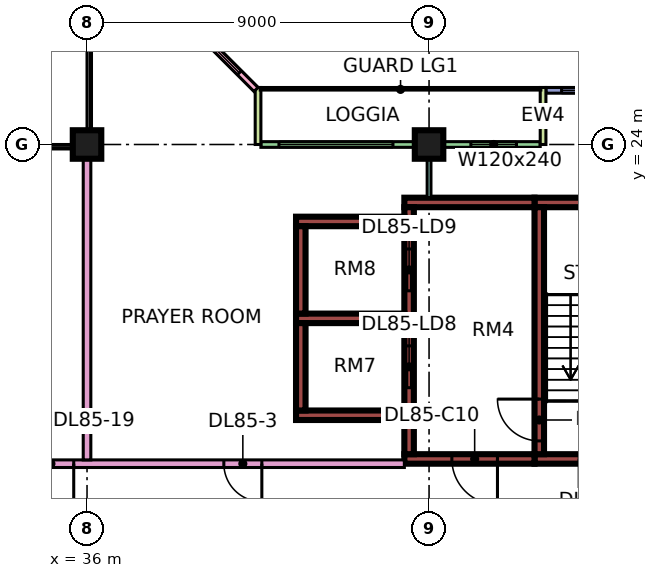
"""IFC4 building model, lengths in metres.
Left out: names, types, materials, properties, quantities, classifications, styles, units other than length and angle.
Written with IfcOpenShell. Run it as: python <this file> out.ifc"""

import sys

from ifc_helpers import new_model, si_unit, direction, frame, frame_2d, origin, origin_2d, place, context, subcontext, project, spatial, rectangle, extrude, element, fill, save


model = new_model("IFC4")
c1 = context("Model", 3, precision=1e-05, world=origin(), true_north=direction((0.0, 1.0)))
c2 = subcontext(c1, "Body", "Model", "MODEL_VIEW")
j1 = project(units=[si_unit("LENGTHUNIT", "METRE"), si_unit("PLANEANGLEUNIT", "RADIAN")], contexts=[c1])
p1 = place(None, origin())
s1 = spatial("IfcSite", under=j1, at=p1, CompositionType="ELEMENT")
p2 = place(p1, origin())
s2 = spatial("IfcBuilding", under=s1, at=p2, CompositionType="ELEMENT")
p3 = place(p2, frame((0.0, 0.0, 365.15)))
s3 = spatial("IfcBuildingStorey", under=s2, at=p3, CompositionType="ELEMENT", Elevation=365.15)
for number, where, z_axis, x_axis in (
    (1, (36.0, 24.0, 0.0), (0.0, 0.0, 1.0), (1.0, 0.0, 0.0)),
    (2, (45.0, 24.0, 0.0), (0.0, 0.0, 1.0), (1.0, 0.0, 0.0)),
):
    element("IfcColumn", number, at=place(p3, frame(where, z_axis=z_axis, x_axis=x_axis)), inside=s3, PredefinedType="COLUMN", context=c2, shape_type="SweptSolid", body=[
        extrude(rectangle(XDim=0.75, YDim=0.75, at=origin_2d()), origin(), (0.0, 0.0, 1.0), 3.75),
    ])
p4 = place(p3, frame((47.775, 15.725, 0.0), z_axis=(0.0, 0.0, 1.0), x_axis=(1.0, 0.0, 0.0)))
e3 = element("IfcWall", 3, at=p4, inside=s3, PredefinedType="SHEAR", context=c2, shape_type="SweptSolid", body=[
    extrude(rectangle(XDim=3.45, YDim=0.25, at=frame_2d((1.725, 0.0))), origin(), (0.0, 0.0, 1.0), 3.75),
])
p5 = place(p4, frame((1.175, 0.0, 0.0)))
e4 = element("IfcOpeningElement", 4, at=p5, cuts=e3, PredefinedType="OPENING", context=c2, shape_type="SweptSolid", body=[
    extrude(rectangle(XDim=1.1, YDim=2.2, at=frame_2d((0.55, 1.1))), frame((0.0, 0.135, 0.0), z_axis=(0.0, -1.0, 0.0), x_axis=(1.0, 0.0, 0.0)), (0.0, 0.0, 1.0), 0.27),
])
p6 = place(p3, frame((47.775, 22.475, 0.0), z_axis=(0.0, 0.0, 1.0), x_axis=(1.0, 0.0, 0.0)))
e5 = element("IfcWall", 5, at=p6, inside=s3, PredefinedType="SHEAR", context=c2, shape_type="SweptSolid", body=[
    extrude(rectangle(XDim=3.45, YDim=0.25, at=frame_2d((1.725, 0.0))), origin(), (0.0, 0.0, 1.0), 3.75),
])
p7 = place(p3, frame((47.9, 15.85, 0.0), z_axis=(0.0, 0.0, 1.0), x_axis=(0.0, 1.0, 0.0)))
e6 = element("IfcWall", 6, at=p7, inside=s3, PredefinedType="SHEAR", context=c2, shape_type="SweptSolid", body=[
    extrude(rectangle(XDim=6.5, YDim=0.25, at=frame_2d((3.25, 0.0))), origin(), (0.0, 0.0, 1.0), 3.75),
])
p8 = place(p7, frame((0.35, 0.0, 0.0)))
e7 = element("IfcOpeningElement", 7, at=p8, cuts=e6, PredefinedType="OPENING", context=c2, shape_type="SweptSolid", body=[
    extrude(rectangle(XDim=1.1, YDim=2.2, at=frame_2d((0.55, 1.1))), frame((0.0, 0.135, 0.0), z_axis=(0.0, -1.0, 0.0), x_axis=(1.0, 0.0, 0.0)), (0.0, 0.0, 1.0), 0.27),
])
p9 = place(p3, frame((44.35, 15.725, 0.0), z_axis=(0.0, 0.0, 1.0), x_axis=(1.0, 0.0, 0.0)))
e8 = element("IfcWall", 8, at=p9, inside=s3, PredefinedType="SHEAR", context=c2, shape_type="SweptSolid", body=[
    extrude(rectangle(XDim=3.425, YDim=0.25, at=frame_2d((1.712, 0.0))), origin(), (0.0, 0.0, 1.0), 3.75),
])
p10 = place(p9, frame((1.25, 0.0, 0.0)))
e9 = element("IfcOpeningElement", 9, at=p10, cuts=e8, PredefinedType="OPENING", context=c2, shape_type="SweptSolid", body=[
    extrude(rectangle(XDim=1.2, YDim=2.2, at=frame_2d((0.6, 1.1))), frame((0.0, 0.135, 0.0), z_axis=(0.0, -1.0, 0.0), x_axis=(1.0, 0.0, 0.0)), (0.0, 0.0, 1.0), 0.27),
])
p11 = place(p3, frame((44.35, 22.475, 0.0), z_axis=(0.0, 0.0, 1.0), x_axis=(1.0, 0.0, 0.0)))
e10 = element("IfcWall", 10, at=p11, inside=s3, PredefinedType="SHEAR", context=c2, shape_type="SweptSolid", body=[
    extrude(rectangle(XDim=3.425, YDim=0.25, at=frame_2d((1.712, 0.0))), origin(), (0.0, 0.0, 1.0), 3.75),
])
p12 = place(p3, frame((44.475, 15.85, 0.0), z_axis=(0.0, 0.0, 1.0), x_axis=(0.0, 1.0, 0.0)))
e11 = element("IfcWall", 11, at=p12, inside=s3, PredefinedType="SHEAR", context=c2, shape_type="SweptSolid", body=[
    extrude(rectangle(XDim=6.5, YDim=0.25, at=frame_2d((3.25, 0.0))), origin(), (0.0, 0.0, 1.0), 3.75),
])
p13 = place(p12, frame((1.75, 0.0, 0.0)))
e12 = element("IfcOpeningElement", 12, at=p13, cuts=e11, PredefinedType="OPENING", context=c2, shape_type="SweptSolid", body=[
    extrude(rectangle(XDim=1.1, YDim=2.2, at=frame_2d((0.55, 1.1))), frame((0.0, 0.135, 0.0), z_axis=(0.0, -1.0, 0.0), x_axis=(1.0, 0.0, 0.0)), (0.0, 0.0, 1.0), 0.27),
])
p14 = place(p12, frame((4.3, 0.0, 0.0)))
e13 = element("IfcOpeningElement", 13, at=p14, cuts=e11, PredefinedType="OPENING", context=c2, shape_type="SweptSolid", body=[
    extrude(rectangle(XDim=1.1, YDim=2.2, at=frame_2d((0.55, 1.1))), frame((0.0, 0.135, 0.0), z_axis=(0.0, -1.0, 0.0), x_axis=(1.0, 0.0, 0.0)), (0.0, 0.0, 1.0), 0.27),
])
for number, where, z_axis, x_axis in (
    (14, (41.5, 16.875, 0.0), (0.0, 0.0, 1.0), (1.0, 0.0, 0.0)),
    (15, (41.5, 19.425, 0.0), (0.0, 0.0, 1.0), (1.0, 0.0, 0.0)),
    (16, (41.5, 21.975, 0.0), (0.0, 0.0, 1.0), (1.0, 0.0, 0.0)),
):
    element("IfcWall", number, at=place(p3, frame(where, z_axis=z_axis, x_axis=x_axis)), inside=s3, PredefinedType="SHEAR", context=c2, shape_type="SweptSolid", body=[
        extrude(rectangle(XDim=2.85, YDim=0.25, at=frame_2d((1.425, 0.0))), origin(), (0.0, 0.0, 1.0), 3.75),
    ])
for number, where, z_axis, x_axis in (
    (17, (41.625, 17.0, 0.0), (0.0, 0.0, 1.0), (0.0, 1.0, 0.0)),
    (18, (41.625, 19.55, 0.0), (0.0, 0.0, 1.0), (0.0, 1.0, 0.0)),
):
    element("IfcWall", number, at=place(p3, frame(where, z_axis=z_axis, x_axis=x_axis)), inside=s3, PredefinedType="SHEAR", context=c2, shape_type="SweptSolid", body=[
        extrude(rectangle(XDim=2.3, YDim=0.25, at=frame_2d((1.15, 0.0))), origin(), (0.0, 0.0, 1.0), 3.75),
    ])
p15 = place(p3, frame((52.5, 25.425, 0.0), z_axis=(0.0, 0.0, 1.0), x_axis=(-1.0, 0.0, 0.0)))
e19 = element("IfcWall", 19, at=p15, inside=s3, PredefinedType="SOLIDWALL", context=c2, shape_type="SweptSolid", body=[
    extrude(rectangle(XDim=4.425, YDim=0.15, at=frame_2d((2.212, 0.0))), origin(), (0.0, 0.0, 1.0), 3.35),
])
p16 = place(p15, frame((0.413, 0.0, 0.45)))
e20 = element("IfcOpeningElement", 20, at=p16, cuts=e19, PredefinedType="OPENING", context=c2, shape_type="SweptSolid", body=[
    extrude(rectangle(XDim=3.6, YDim=2.4, at=frame_2d((1.8, 1.2))), frame((0.0, 0.085, 0.0), z_axis=(0.0, -1.0, 0.0), x_axis=(1.0, 0.0, 0.0)), (0.0, 0.0, 1.0), 0.17),
])
p17 = place(p3, frame((47.925, 24.0, 0.0), z_axis=(0.0, 0.0, 1.0), x_axis=(-1.0, 0.0, 0.0)))
e21 = element("IfcWall", 21, at=p17, inside=s3, PredefinedType="SOLIDWALL", context=c2, shape_type="SweptSolid", body=[
    extrude(rectangle(XDim=7.35, YDim=0.15, at=frame_2d((3.675, 0.0))), origin(), (0.0, 0.0, 1.0), 3.35),
])
p18 = place(p17, frame((0.625, 0.0, 0.45)))
e22 = element("IfcOpeningElement", 22, at=p18, cuts=e21, PredefinedType="OPENING", context=c2, shape_type="SweptSolid", body=[
    extrude(rectangle(XDim=1.2, YDim=2.4, at=frame_2d((0.6, 1.2))), frame((0.0, 0.085, 0.0), z_axis=(0.0, -1.0, 0.0), x_axis=(1.0, 0.0, 0.0)), (0.0, 0.0, 1.0), 0.17),
])
p19 = place(p17, frame((3.875, 0.0, 0.45)))
e23 = element("IfcOpeningElement", 23, at=p19, cuts=e21, PredefinedType="OPENING", context=c2, shape_type="SweptSolid", body=[
    extrude(rectangle(XDim=3.0, YDim=2.4, at=frame_2d((1.5, 1.2))), frame((0.0, 0.085, 0.0), z_axis=(0.0, -1.0, 0.0), x_axis=(1.0, 0.0, 0.0)), (0.0, 0.0, 1.0), 0.17),
])
for number, where, z_axis, x_axis in (
    (24, (48.0, 25.5, 0.0), (0.0, 0.0, 1.0), (0.0, -1.0, 0.0)),
    (25, (40.5, 25.5, 0.0), (0.0, 0.0, 1.0), (0.0, -1.0, 0.0)),
):
    element("IfcWall", number, at=place(p3, frame(where, z_axis=z_axis, x_axis=x_axis)), inside=s3, PredefinedType="SOLIDWALL", context=c2, shape_type="SweptSolid", body=[
        extrude(rectangle(XDim=1.5, YDim=0.15, at=frame_2d((0.75, 0.0))), origin(), (0.0, 0.0, 1.0), 3.35),
    ])
p20 = place(p3, frame((40.447, 25.447, 0.0), z_axis=(0.0, 0.0, 1.0), x_axis=(-0.707106781187, 0.707106781187, 0.0)))
e26 = element("IfcWall", 26, at=p20, inside=s3, PredefinedType="SOLIDWALL", context=c2, shape_type="SweptSolid", body=[
    extrude(rectangle(XDim=4.243, YDim=0.15, at=frame_2d((2.121, 0.0))), origin(), (0.0, 0.0, 1.0), 3.35),
])
p21 = place(p20, frame((0.621, 0.0, 0.45)))
e27 = element("IfcOpeningElement", 27, at=p21, cuts=e26, PredefinedType="OPENING", context=c2, shape_type="SweptSolid", body=[
    extrude(rectangle(XDim=3.0, YDim=2.4, at=frame_2d((1.5, 1.2))), frame((0.0, 0.085, 0.0), z_axis=(0.0, -1.0, 0.0), x_axis=(1.0, 0.0, 0.0)), (0.0, 0.0, 1.0), 0.17),
])
p22 = place(p3, frame((34.0, 15.6, 0.0), z_axis=(0.0, 0.0, 1.0), x_axis=(1.0, 0.0, 0.0)))
e28 = element("IfcWall", 28, at=p22, inside=s3, PredefinedType="PARTITIONING", context=c2, shape_type="SweptSolid", body=[
    extrude(rectangle(XDim=10.35, YDim=0.2, at=frame_2d((5.175, 0.0))), origin(), (0.0, 0.0, 1.0), 3.35),
])
p23 = place(p22, frame((5.6, 0.0, 0.0)))
e29 = element("IfcOpeningElement", 29, at=p23, cuts=e28, PredefinedType="OPENING", context=c2, shape_type="SweptSolid", body=[
    extrude(rectangle(XDim=1.0, YDim=2.1, at=frame_2d((0.5, 1.05))), frame((0.0, 0.11, 0.0), z_axis=(0.0, -1.0, 0.0), x_axis=(1.0, 0.0, 0.0)), (0.0, 0.0, 1.0), 0.22),
])
p24 = place(p22, frame((0.45, 0.0, 0.0)))
e30 = element("IfcOpeningElement", 30, at=p24, cuts=e28, PredefinedType="OPENING", context=c2, shape_type="SweptSolid", body=[
    extrude(rectangle(XDim=1.2, YDim=2.1, at=frame_2d((0.6, 1.05))), frame((0.0, 0.11, 0.0), z_axis=(0.0, -1.0, 0.0), x_axis=(1.0, 0.0, 0.0)), (0.0, 0.0, 1.0), 0.22),
])
p25 = place(p3, frame((36.0, 15.7, 0.0), z_axis=(0.0, 0.0, 1.0), x_axis=(0.0, 1.0, 0.0)))
e31 = element("IfcWall", 31, at=p25, inside=s3, PredefinedType="PARTITIONING", context=c2, shape_type="SweptSolid", body=[
    extrude(rectangle(XDim=8.3, YDim=0.2, at=frame_2d((4.15, 0.0))), origin(), (0.0, 0.0, 1.0), 3.35),
])
p26 = place(p3, frame((45.0, 22.6, 0.0), z_axis=(0.0, 0.0, 1.0), x_axis=(0.0, 1.0, 0.0)))
e32 = element("IfcWall", 32, at=p26, inside=s3, PredefinedType="PARTITIONING", context=c2, shape_type="SweptSolid", body=[
    extrude(rectangle(XDim=1.326, YDim=0.1, at=frame_2d((0.663, 0.0))), origin(), (0.0, 0.0, 1.0), 3.35),
])
p27 = place(p16, origin())
e33 = element("IfcWindow", 33, at=p27, inside=s3, PartitioningType="SINGLE_PANEL", PredefinedType="WINDOW", context=c2, shape_type="SweptSolid", body=[
    extrude(rectangle(XDim=3.6, YDim=2.4, at=frame_2d((1.8, 1.2))), frame((0.0, 0.03, 0.0), z_axis=(0.0, -1.0, 0.0), x_axis=(1.0, 0.0, 0.0)), (0.0, 0.0, 1.0), 0.06),
])
fill(e20, e33)
p28 = place(p18, origin())
e34 = element("IfcWindow", 34, at=p28, inside=s3, PartitioningType="SINGLE_PANEL", PredefinedType="WINDOW", context=c2, shape_type="SweptSolid", body=[
    extrude(rectangle(XDim=1.2, YDim=2.4, at=frame_2d((0.6, 1.2))), frame((0.0, 0.03, 0.0), z_axis=(0.0, -1.0, 0.0), x_axis=(1.0, 0.0, 0.0)), (0.0, 0.0, 1.0), 0.06),
])
fill(e22, e34)
p29 = place(p19, origin())
e35 = element("IfcWindow", 35, at=p29, inside=s3, PartitioningType="SINGLE_PANEL", PredefinedType="WINDOW", context=c2, shape_type="SweptSolid", body=[
    extrude(rectangle(XDim=3.0, YDim=2.4, at=frame_2d((1.5, 1.2))), frame((0.0, 0.03, 0.0), z_axis=(0.0, -1.0, 0.0), x_axis=(1.0, 0.0, 0.0)), (0.0, 0.0, 1.0), 0.06),
])
fill(e23, e35)
p30 = place(p21, origin())
e36 = element("IfcWindow", 36, at=p30, inside=s3, PartitioningType="SINGLE_PANEL", PredefinedType="WINDOW", context=c2, shape_type="SweptSolid", body=[
    extrude(rectangle(XDim=3.0, YDim=2.4, at=frame_2d((1.5, 1.2))), frame((0.0, 0.03, 0.0), z_axis=(0.0, -1.0, 0.0), x_axis=(1.0, 0.0, 0.0)), (0.0, 0.0, 1.0), 0.06),
])
fill(e27, e36)
p31 = place(p10, origin())
e37 = element("IfcDoor", 37, at=p31, inside=s3, OperationType="SINGLE_SWING_RIGHT", PredefinedType="DOOR", context=c2, shape_type="SweptSolid", body=[
    extrude(rectangle(XDim=1.2, YDim=2.2, at=frame_2d((0.6, 1.1))), frame((0.0, 0.025, 0.0), z_axis=(0.0, -1.0, 0.0), x_axis=(1.0, 0.0, 0.0)), (0.0, 0.0, 1.0), 0.05),
])
fill(e9, e37)
p32 = place(p8, frame((1.1, 0.0, 0.0), z_axis=(0.0, 0.0, 1.0), x_axis=(-1.0, 0.0, 0.0)))
e38 = element("IfcDoor", 38, at=p32, inside=s3, OperationType="SINGLE_SWING_RIGHT", PredefinedType="DOOR", context=c2, shape_type="SweptSolid", body=[
    extrude(rectangle(XDim=1.1, YDim=2.2, at=frame_2d((0.55, 1.1))), frame((0.0, 0.025, 0.0), z_axis=(0.0, -1.0, 0.0), x_axis=(1.0, 0.0, 0.0)), (0.0, 0.0, 1.0), 0.05),
])
fill(e7, e38)
p33 = place(p13, origin())
e39 = element("IfcDoor", 39, at=p33, inside=s3, OperationType="DOUBLE_DOOR_SLIDING", PredefinedType="DOOR", context=c2, shape_type="SweptSolid", body=[
    extrude(rectangle(XDim=1.1, YDim=2.2, at=frame_2d((0.55, 1.1))), frame((0.0, 0.025, 0.0), z_axis=(0.0, -1.0, 0.0), x_axis=(1.0, 0.0, 0.0)), (0.0, 0.0, 1.0), 0.05),
])
fill(e12, e39)
p34 = place(p14, origin())
e40 = element("IfcDoor", 40, at=p34, inside=s3, OperationType="DOUBLE_DOOR_SLIDING", PredefinedType="DOOR", context=c2, shape_type="SweptSolid", body=[
    extrude(rectangle(XDim=1.1, YDim=2.2, at=frame_2d((0.55, 1.1))), frame((0.0, 0.025, 0.0), z_axis=(0.0, -1.0, 0.0), x_axis=(1.0, 0.0, 0.0)), (0.0, 0.0, 1.0), 0.05),
])
fill(e13, e40)
p35 = place(p23, origin())
e41 = element("IfcDoor", 41, at=p35, inside=s3, OperationType="SINGLE_SWING_RIGHT", PredefinedType="DOOR", context=c2, shape_type="SweptSolid", body=[
    extrude(rectangle(XDim=1.0, YDim=2.1, at=frame_2d((0.5, 1.05))), frame((0.0, 0.025, 0.0), z_axis=(0.0, -1.0, 0.0), x_axis=(1.0, 0.0, 0.0)), (0.0, 0.0, 1.0), 0.05),
])
fill(e29, e41)
p36 = place(p24, origin())
e42 = element("IfcDoor", 42, at=p36, inside=s3, OperationType="SINGLE_SWING_RIGHT", PredefinedType="DOOR", context=c2, shape_type="SweptSolid", body=[
    extrude(rectangle(XDim=1.2, YDim=2.1, at=frame_2d((0.6, 1.05))), frame((0.0, 0.025, 0.0), z_axis=(0.0, -1.0, 0.0), x_axis=(1.0, 0.0, 0.0)), (0.0, 0.0, 1.0), 0.05),
])
fill(e30, e42)
save(model, sys.argv[1])
